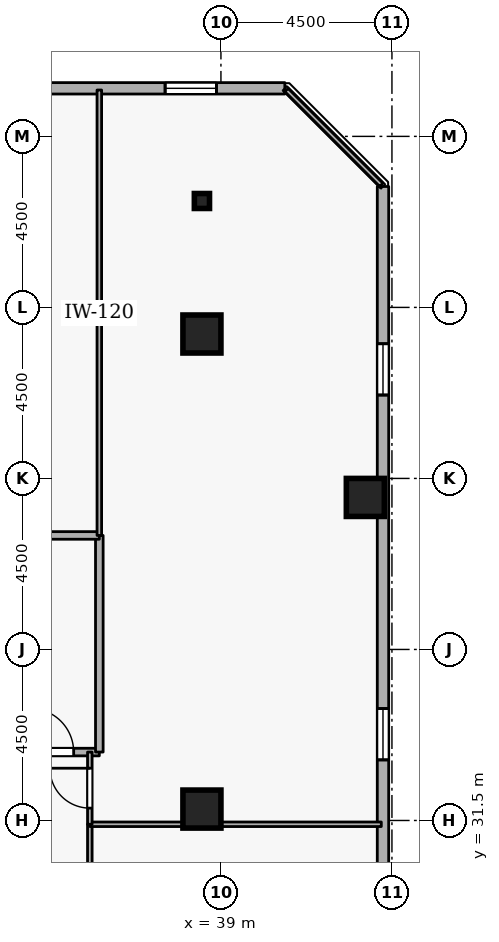
"""IFC4 building model, lengths in metres.
Left out: names, types, materials, properties, quantities, classifications, styles, units other than length and angle.
Written with IfcOpenShell. Run it as: python <this file> out.ifc"""

import sys

from ifc_helpers import new_model, si_unit, direction, frame, frame_2d, origin, origin_2d, place, context, subcontext, project, spatial, rectangle, i_section, extrude, element, fill, save


model = new_model("IFC4")
c1 = context("Model", 3, precision=1e-05, world=origin(), true_north=direction((0.0, 1.0)))
c2 = subcontext(c1, "Body", "Model", "MODEL_VIEW")
j1 = project(units=[si_unit("LENGTHUNIT", "METRE"), si_unit("PLANEANGLEUNIT", "RADIAN")], contexts=[c1])
p1 = place(None, origin())
s1 = spatial("IfcSite", under=j1, at=p1, CompositionType="ELEMENT")
p2 = place(p1, origin())
s2 = spatial("IfcBuilding", under=s1, at=p2, CompositionType="ELEMENT")
p3 = place(p2, frame((0.0, 0.0, 218.1)))
s3 = spatial("IfcBuildingStorey", under=s2, at=p3, CompositionType="ELEMENT", Elevation=218.1)
for number, where, z_axis, x_axis in (
    (1, (42.8, 40.0, 0.0), (0.0, 0.0, 1.0), (1.0, 0.0, 0.0)),
    (2, (38.5, 44.3, 0.0), (0.0, 0.0, 1.0), (1.0, 0.0, 0.0)),
    (3, (38.5, 31.8, 0.0), (0.0, 0.0, 1.0), (1.0, 0.0, 0.0)),
):
    element("IfcColumn", number, at=place(p3, frame(where, z_axis=z_axis, x_axis=x_axis)), inside=s3, PredefinedType="COLUMN", context=c2, shape_type="SweptSolid", body=[
        extrude(rectangle(XDim=1.0, YDim=1.0, at=origin_2d()), origin(), (0.0, 0.0, 1.0), 3.6),
    ])
p4 = place(p3, frame((38.5, 47.8, 0.0), z_axis=(0.0, 0.0, 1.0), x_axis=(1.0, 0.0, 0.0)))
e4 = element("IfcColumn", 4, at=p4, inside=s3, PredefinedType="COLUMN", context=c2, shape_type="SweptSolid", body=[
    extrude(i_section(OverallWidth=0.399, OverallDepth=0.394, WebThickness=0.023, FlangeThickness=0.037, FilletRadius=0.015, at=origin_2d()), origin(), (0.0, 0.0, 1.0), 3.6),
])
p5 = place(p3, frame((43.264, 12.094, 0.0), z_axis=(0.0, 0.0, 1.0), x_axis=(2.7061402e-05, 0.999999999634, 0.0)))
e5 = element("IfcWall", 5, at=p5, inside=s3, PredefinedType="STANDARD", context=c2, shape_type="SweptSolid", body=[
    extrude(rectangle(XDim=36.087, YDim=0.3, at=frame_2d((18.043, 0.0))), origin(), (0.0, 0.0, 1.0), 2.66),
])
p6 = place(p5, frame((6.6, 0.0, 0.72)))
e6 = element("IfcOpeningElement", 6, at=p6, cuts=e5, PredefinedType="OPENING", context=c2, shape_type="SweptSolid", body=[
    extrude(rectangle(XDim=1.35, YDim=1.05, at=frame_2d((0.675, 0.525))), frame((0.0, 0.16, 0.0), z_axis=(0.0, -1.0, 0.0), x_axis=(1.0, 0.0, 0.0)), (0.0, 0.0, 1.0), 0.32),
])
p7 = place(p5, frame((21.0, 0.0, 0.72)))
e7 = element("IfcOpeningElement", 7, at=p7, cuts=e5, PredefinedType="OPENING", context=c2, shape_type="SweptSolid", body=[
    extrude(rectangle(XDim=1.35, YDim=1.05, at=frame_2d((0.675, 0.525))), frame((0.0, 0.16, 0.0), z_axis=(0.0, -1.0, 0.0), x_axis=(1.0, 0.0, 0.0)), (0.0, 0.0, 1.0), 0.32),
])
p8 = place(p5, frame((30.6, 0.0, 0.72)))
e8 = element("IfcOpeningElement", 8, at=p8, cuts=e5, PredefinedType="OPENING", context=c2, shape_type="SweptSolid", body=[
    extrude(rectangle(XDim=1.35, YDim=1.05, at=frame_2d((0.675, 0.525))), frame((0.0, 0.16, 0.0), z_axis=(0.0, -1.0, 0.0), x_axis=(1.0, 0.0, 0.0)), (0.0, 0.0, 1.0), 0.32),
])
p9 = place(p3, frame((40.681, 50.765, 0.0), z_axis=(0.0, 0.0, 1.0), x_axis=(-0.999999999634, -2.7061402e-05, 0.0)))
e9 = element("IfcWall", 9, at=p9, inside=s3, PredefinedType="STANDARD", context=c2, shape_type="SweptSolid", body=[
    extrude(rectangle(XDim=36.087, YDim=0.3, at=frame_2d((18.043, 0.0))), origin(), (0.0, 0.0, 1.0), 2.66),
])
p10 = place(p9, frame((1.8, 0.0, 0.72)))
e10 = element("IfcOpeningElement", 10, at=p10, cuts=e9, PredefinedType="OPENING", context=c2, shape_type="SweptSolid", body=[
    extrude(rectangle(XDim=1.35, YDim=1.05, at=frame_2d((0.675, 0.525))), frame((0.0, 0.16, 0.0), z_axis=(0.0, -1.0, 0.0), x_axis=(1.0, 0.0, 0.0)), (0.0, 0.0, 1.0), 0.32),
])
p11 = place(p9, frame((6.6, 0.0, 0.72)))
e11 = element("IfcOpeningElement", 11, at=p11, cuts=e9, PredefinedType="OPENING", context=c2, shape_type="SweptSolid", body=[
    extrude(rectangle(XDim=1.35, YDim=1.05, at=frame_2d((0.675, 0.525))), frame((0.0, 0.16, 0.0), z_axis=(0.0, -1.0, 0.0), x_axis=(1.0, 0.0, 0.0)), (0.0, 0.0, 1.0), 0.32),
])
p12 = place(p9, frame((11.4, 0.0, 0.72)))
e12 = element("IfcOpeningElement", 12, at=p12, cuts=e9, PredefinedType="OPENING", context=c2, shape_type="SweptSolid", body=[
    extrude(rectangle(XDim=1.35, YDim=1.05, at=frame_2d((0.675, 0.525))), frame((0.0, 0.16, 0.0), z_axis=(0.0, -1.0, 0.0), x_axis=(1.0, 0.0, 0.0)), (0.0, 0.0, 1.0), 0.32),
])
p13 = place(p9, frame((16.2, 0.0, 0.72)))
e13 = element("IfcOpeningElement", 13, at=p13, cuts=e9, PredefinedType="OPENING", context=c2, shape_type="SweptSolid", body=[
    extrude(rectangle(XDim=1.35, YDim=1.05, at=frame_2d((0.675, 0.525))), frame((0.0, 0.16, 0.0), z_axis=(0.0, -1.0, 0.0), x_axis=(1.0, 0.0, 0.0)), (0.0, 0.0, 1.0), 0.32),
])
p14 = place(p9, frame((21.0, 0.0, 0.72)))
e14 = element("IfcOpeningElement", 14, at=p14, cuts=e9, PredefinedType="OPENING", context=c2, shape_type="SweptSolid", body=[
    extrude(rectangle(XDim=1.35, YDim=1.05, at=frame_2d((0.675, 0.525))), frame((0.0, 0.16, 0.0), z_axis=(0.0, -1.0, 0.0), x_axis=(1.0, 0.0, 0.0)), (0.0, 0.0, 1.0), 0.32),
])
p15 = place(p9, frame((30.6, 0.0, 0.72)))
e15 = element("IfcOpeningElement", 15, at=p15, cuts=e9, PredefinedType="OPENING", context=c2, shape_type="SweptSolid", body=[
    extrude(rectangle(XDim=1.35, YDim=1.05, at=frame_2d((0.675, 0.525))), frame((0.0, 0.16, 0.0), z_axis=(0.0, -1.0, 0.0), x_axis=(1.0, 0.0, 0.0)), (0.0, 0.0, 1.0), 0.32),
])
p16 = place(p3, frame((33.3, 33.3, 0.0), z_axis=(0.0, 0.0, 1.0), x_axis=(1.0, 0.0, 0.0)))
e16 = element("IfcWall", 16, at=p16, inside=s3, PredefinedType="STANDARD", context=c2, shape_type="SweptSolid", body=[
    extrude(rectangle(XDim=2.5, YDim=0.2, at=frame_2d((1.25, 0.0))), origin(), (0.0, 0.0, 1.0), 3.26),
])
p17 = place(p16, frame((0.675, 0.0, 0.0)))
e17 = element("IfcOpeningElement", 17, at=p17, cuts=e16, PredefinedType="OPENING", context=c2, shape_type="SweptSolid", body=[
    extrude(rectangle(XDim=1.15, YDim=2.1, at=frame_2d((0.575, 1.05))), frame((0.0, 0.11, 0.0), z_axis=(0.0, -1.0, 0.0), x_axis=(1.0, 0.0, 0.0)), (0.0, 0.0, 1.0), 0.22),
])
p18 = place(p3, frame((35.8, 33.3, 0.0), z_axis=(0.0, 0.0, 1.0), x_axis=(0.0, 1.0, 0.0)))
e18 = element("IfcWall", 18, at=p18, inside=s3, PredefinedType="STANDARD", context=c2, shape_type="SweptSolid", body=[
    extrude(rectangle(XDim=5.7, YDim=0.2, at=frame_2d((2.85, 0.0))), origin(), (0.0, 0.0, 1.0), 3.26),
])
p19 = place(p3, frame((35.8, 39.0, 0.0), z_axis=(0.0, 0.0, 1.0), x_axis=(-1.0, 0.0, 0.0)))
e19 = element("IfcWall", 19, at=p19, inside=s3, PredefinedType="STANDARD", context=c2, shape_type="SweptSolid", body=[
    extrude(rectangle(XDim=2.5, YDim=0.2, at=frame_2d((1.25, 0.0))), origin(), (0.0, 0.0, 1.0), 3.26),
])
p20 = place(p3, frame((35.55, 26.6, 0.0), z_axis=(0.0, 0.0, 1.0), x_axis=(0.0, 1.0, 0.0)))
e20 = element("IfcWall", 20, at=p20, inside=s3, PredefinedType="PARTITIONING", context=c2, shape_type="SweptSolid", body=[
    extrude(rectangle(XDim=4.8, YDim=0.12, at=frame_2d((2.4, 0.0))), origin(), (0.0, 0.0, 1.0), 3.26),
])
p21 = place(p20, frame((1.925, 0.0, 0.0)))
e21 = element("IfcOpeningElement", 21, at=p21, cuts=e20, PredefinedType="OPENING", context=c2, shape_type="SweptSolid", body=[
    extrude(rectangle(XDim=0.95, YDim=2.1, at=frame_2d((0.475, 1.05))), frame((0.0, 0.07, 0.0), z_axis=(0.0, -1.0, 0.0), x_axis=(1.0, 0.0, 0.0)), (0.0, 0.0, 1.0), 0.14),
])
p22 = place(p3, frame((35.55, 31.4, 0.0), z_axis=(0.0, 0.0, 1.0), x_axis=(1.0, 0.0, 0.0)))
e22 = element("IfcWall", 22, at=p22, inside=s3, PredefinedType="PARTITIONING", context=c2, shape_type="SweptSolid", body=[
    extrude(rectangle(XDim=7.67, YDim=0.12, at=frame_2d((3.835, 0.0))), origin(), (0.0, 0.0, 1.0), 3.26),
])
p23 = place(p3, frame((35.8, 39.0, 0.0), z_axis=(0.0, 0.0, 1.0), x_axis=(0.0, 1.0, 0.0)))
e23 = element("IfcWall", 23, at=p23, inside=s3, PredefinedType="PARTITIONING", context=c2, shape_type="SweptSolid", body=[
    extrude(rectangle(XDim=11.72, YDim=0.12, at=frame_2d((5.86, 0.0))), origin(), (0.0, 0.0, 1.0), 3.26),
])
p24 = place(p3, frame((40.725, 50.72, 0.0), z_axis=(0.0, 0.0, 1.0), x_axis=(0.707106781187, -0.707106781187, 0.0)))
e24 = element("IfcWall", 24, at=p24, inside=s3, PredefinedType="PARTITIONING", context=c2, shape_type="SweptSolid", body=[
    extrude(rectangle(XDim=3.528, YDim=0.12, at=frame_2d((1.764, 0.0))), origin(), (0.0, 0.0, 1.0), 3.26),
])
p25 = place(p3, frame((35.55, 31.4, 0.0), z_axis=(0.0, 0.0, 1.0), x_axis=(0.0, 1.0, 0.0)))
e25 = element("IfcWall", 25, at=p25, inside=s3, PredefinedType="PARTITIONING", context=c2, shape_type="SweptSolid", body=[
    extrude(rectangle(XDim=1.9, YDim=0.12, at=frame_2d((0.95, 0.0))), origin(), (0.0, 0.0, 1.0), 3.26),
])
p26 = place(p25, frame((0.425, 0.0, 0.0)))
e26 = element("IfcOpeningElement", 26, at=p26, cuts=e25, PredefinedType="OPENING", context=c2, shape_type="SweptSolid", body=[
    extrude(rectangle(XDim=1.05, YDim=2.1, at=frame_2d((0.525, 1.05))), frame((0.0, 0.07, 0.0), z_axis=(0.0, -1.0, 0.0), x_axis=(1.0, 0.0, 0.0)), (0.0, 0.0, 1.0), 0.14),
])
p27 = place(p7, origin())
e27 = element("IfcWindow", 27, at=p27, inside=s3, PartitioningType="SINGLE_PANEL", PredefinedType="WINDOW", context=c2, shape_type="SweptSolid", body=[
    extrude(rectangle(XDim=1.35, YDim=1.05, at=frame_2d((0.675, 0.525))), frame((0.0, 0.03, 0.0), z_axis=(0.0, -1.0, 0.0), x_axis=(1.0, 0.0, 0.0)), (0.0, 0.0, 1.0), 0.06),
])
fill(e7, e27)
p28 = place(p8, origin())
e28 = element("IfcWindow", 28, at=p28, inside=s3, PartitioningType="SINGLE_PANEL", PredefinedType="WINDOW", context=c2, shape_type="SweptSolid", body=[
    extrude(rectangle(XDim=1.35, YDim=1.05, at=frame_2d((0.675, 0.525))), frame((0.0, 0.03, 0.0), z_axis=(0.0, -1.0, 0.0), x_axis=(1.0, 0.0, 0.0)), (0.0, 0.0, 1.0), 0.06),
])
fill(e8, e28)
p29 = place(p10, origin())
e29 = element("IfcWindow", 29, at=p29, inside=s3, PartitioningType="SINGLE_PANEL", PredefinedType="WINDOW", context=c2, shape_type="SweptSolid", body=[
    extrude(rectangle(XDim=1.35, YDim=1.05, at=frame_2d((0.675, 0.525))), frame((0.0, 0.03, 0.0), z_axis=(0.0, -1.0, 0.0), x_axis=(1.0, 0.0, 0.0)), (0.0, 0.0, 1.0), 0.06),
])
fill(e10, e29)
p30 = place(p17, origin())
e30 = element("IfcDoor", 30, at=p30, inside=s3, OperationType="SINGLE_SWING_LEFT", PredefinedType="DOOR", context=c2, shape_type="SweptSolid", body=[
    extrude(rectangle(XDim=1.15, YDim=2.1, at=frame_2d((0.575, 1.05))), frame((0.0, 0.025, 0.0), z_axis=(0.0, -1.0, 0.0), x_axis=(1.0, 0.0, 0.0)), (0.0, 0.0, 1.0), 0.05),
])
fill(e17, e30)
p31 = place(p26, origin())
e31 = element("IfcDoor", 31, at=p31, inside=s3, OperationType="SINGLE_SWING_RIGHT", PredefinedType="DOOR", context=c2, shape_type="SweptSolid", body=[
    extrude(rectangle(XDim=1.05, YDim=2.1, at=frame_2d((0.525, 1.05))), frame((0.0, 0.025, 0.0), z_axis=(0.0, -1.0, 0.0), x_axis=(1.0, 0.0, 0.0)), (0.0, 0.0, 1.0), 0.05),
])
fill(e26, e31)
save(model, sys.argv[1])
